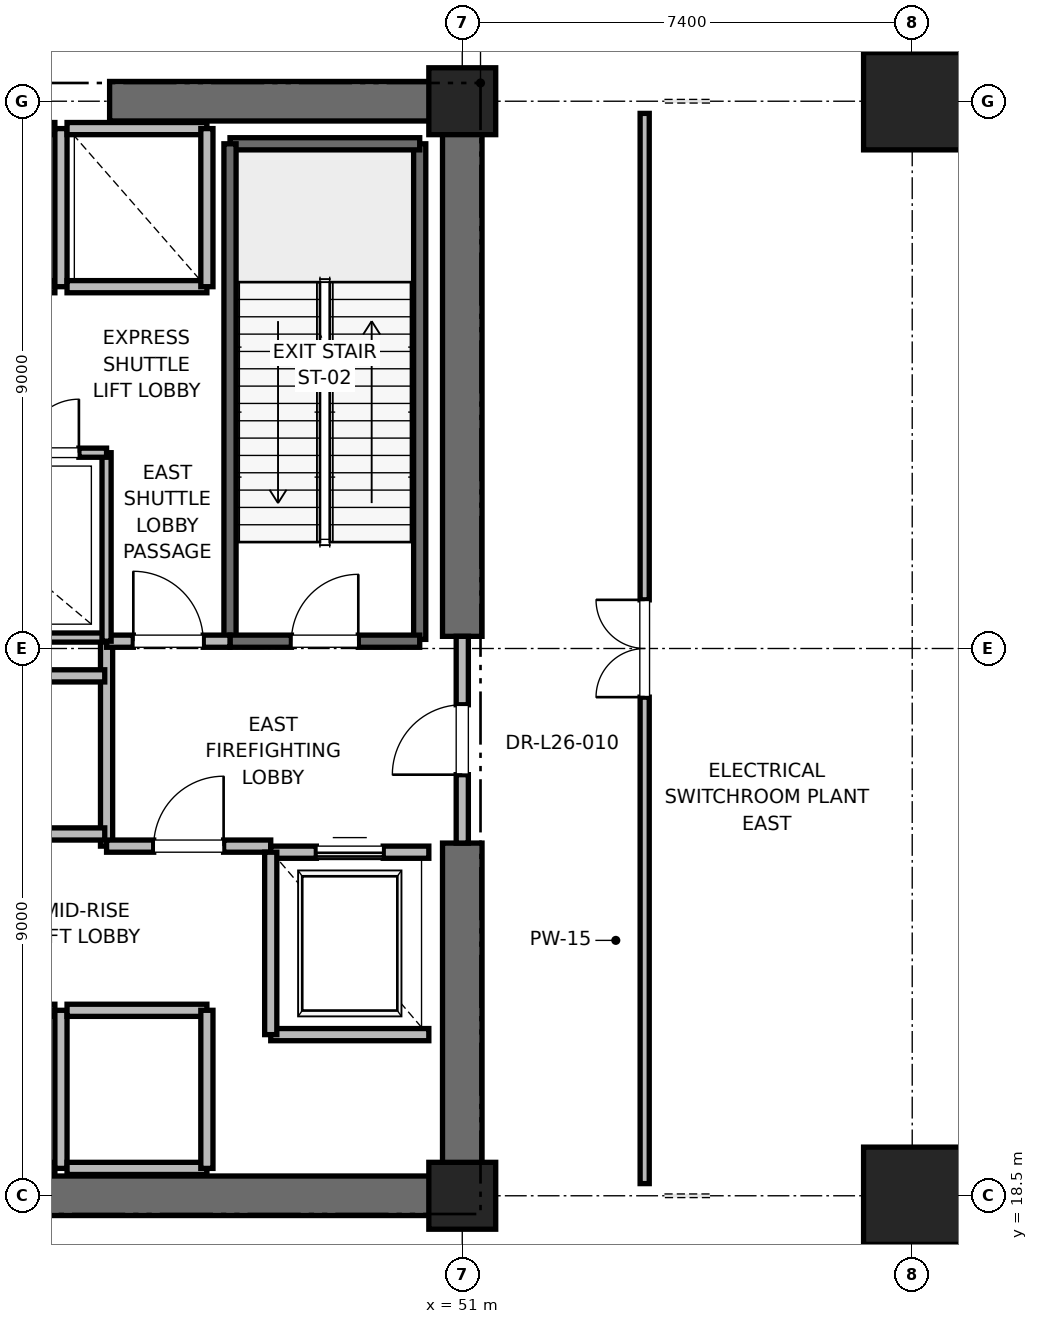
"""IFC4 building model, lengths in metres.
Left out: names, types, materials, properties, quantities, classifications, styles, units other than length and angle.
Written with IfcOpenShell. Run it as: python <this file> out.ifc"""

import sys

from ifc_helpers import new_model, si_unit, direction, frame, frame_2d, origin, origin_2d, place, context, subcontext, project, spatial, rectangle, extrude, element, fill, save


model = new_model("IFC4")
c1 = context("Model", 3, precision=1e-05, world=origin(), true_north=direction((0.0, 1.0)))
c2 = subcontext(c1, "Body", "Model", "MODEL_VIEW")
j1 = project(units=[si_unit("LENGTHUNIT", "METRE"), si_unit("PLANEANGLEUNIT", "RADIAN")], contexts=[c1])
p1 = place(None, origin())
s1 = spatial("IfcSite", under=j1, at=p1, CompositionType="ELEMENT")
p2 = place(p1, origin())
s2 = spatial("IfcBuilding", under=s1, at=p2, CompositionType="ELEMENT")
p3 = place(p2, frame((0.0, 0.0, 113.0)))
s3 = spatial("IfcBuildingStorey", under=s2, at=p3, CompositionType="ELEMENT", Elevation=113.0)
for number, where, z_axis, x_axis in (
    (1, (58.4, 18.5, 0.0), (0.0, 0.0, 1.0), (1.0, 0.0, 0.0)),
    (2, (58.4, 36.5, 0.0), (0.0, 0.0, 1.0), (1.0, 0.0, 0.0)),
):
    element("IfcColumn", number, at=place(p3, frame(where, z_axis=z_axis, x_axis=x_axis)), inside=s3, PredefinedType="COLUMN", context=c2, shape_type="SweptSolid", body=[
        extrude(rectangle(XDim=1.6, YDim=1.6, at=origin_2d()), origin(), (0.0, 0.0, 1.0), 5.4),
    ])
for number, where, z_axis, x_axis in (
    (3, (51.0, 18.5, 0.0), (0.0, 0.0, 1.0), (1.0, 0.0, 0.0)),
    (4, (51.0, 36.5, 0.0), (0.0, 0.0, 1.0), (1.0, 0.0, 0.0)),
):
    element("IfcColumn", number, at=place(p3, frame(where, z_axis=z_axis, x_axis=x_axis)), inside=s3, PredefinedType="PILASTER", context=c2, shape_type="SweptSolid", body=[
        extrude(rectangle(XDim=1.1, YDim=1.1, at=origin_2d()), origin(), (0.0, 0.0, 1.0), 5.4),
    ])
p4 = place(p3, frame((41.8, 18.5, 0.0), z_axis=(0.0, 0.0, 1.0), x_axis=(1.0, 0.0, 0.0)))
e5 = element("IfcWall", 5, at=p4, inside=s3, PredefinedType="SHEAR", context=c2, shape_type="SweptSolid", body=[
    extrude(rectangle(XDim=9.2, YDim=0.65, at=frame_2d((4.6, 0.0))), origin(), (0.0, 0.0, 1.0), 5.1),
])
for number, where, z_axis, x_axis in (
    (6, (45.2, 36.5, 0.0), (0.0, 0.0, 1.0), (1.0, 0.0, 0.0)),
    (7, (51.0, 18.5, 0.0), (0.0, 0.0, 1.0), (0.0, 1.0, 0.0)),
):
    element("IfcWall", number, at=place(p3, frame(where, z_axis=z_axis, x_axis=x_axis)), inside=s3, PredefinedType="SHEAR", context=c2, shape_type="SweptSolid", body=[
        extrude(rectangle(XDim=5.8, YDim=0.65, at=frame_2d((2.9, 0.0))), origin(), (0.0, 0.0, 1.0), 5.1),
    ])
p5 = place(p3, frame((51.0, 27.7, 0.0), z_axis=(0.0, 0.0, 1.0), x_axis=(0.0, 1.0, 0.0)))
e8 = element("IfcWall", 8, at=p5, inside=s3, PredefinedType="SHEAR", context=c2, shape_type="SweptSolid", body=[
    extrude(rectangle(XDim=8.8, YDim=0.65, at=frame_2d((4.4, 0.0))), origin(), (0.0, 0.0, 1.0), 5.1),
])
p6 = place(p3, frame((50.3, 27.65, 0.0), z_axis=(0.0, 0.0, 1.0), x_axis=(0.0, 1.0, 0.0)))
e9 = element("IfcWall", 9, at=p6, inside=s3, PredefinedType="SOLIDWALL", context=c2, shape_type="SweptSolid", body=[
    extrude(rectangle(XDim=8.15, YDim=0.2, at=frame_2d((4.075, 0.0))), origin(), (0.0, 0.0, 1.0), 5.1),
])
p7 = place(p3, frame((47.18, 35.8, 0.0), z_axis=(0.0, 0.0, 1.0), x_axis=(1.0, 0.0, 0.0)))
e10 = element("IfcWall", 10, at=p7, inside=s3, PredefinedType="SOLIDWALL", context=c2, shape_type="SweptSolid", body=[
    extrude(rectangle(XDim=3.12, YDim=0.2, at=frame_2d((1.56, 0.0))), origin(), (0.0, 0.0, 1.0), 5.1),
])
p8 = place(p3, frame((47.18, 27.62, 0.0), z_axis=(0.0, 0.0, 1.0), x_axis=(0.0, 1.0, 0.0)))
e11 = element("IfcWall", 11, at=p8, inside=s3, PredefinedType="SOLIDWALL", context=c2, shape_type="SweptSolid", body=[
    extrude(rectangle(XDim=8.18, YDim=0.2, at=frame_2d((4.09, 0.0))), origin(), (0.0, 0.0, 1.0), 5.1),
])
p9 = place(p3, frame((47.18, 27.62, 0.0), z_axis=(0.0, 0.0, 1.0), x_axis=(1.0, 0.0, 0.0)))
e12 = element("IfcWall", 12, at=p9, inside=s3, PredefinedType="SOLIDWALL", context=c2, shape_type="SweptSolid", body=[
    extrude(rectangle(XDim=3.12, YDim=0.2, at=frame_2d((1.56, 0.0))), origin(), (0.0, 0.0, 1.0), 5.1),
])
p10 = place(p9, frame((1.01, 0.0, 0.0)))
e13 = element("IfcOpeningElement", 13, at=p10, cuts=e12, PredefinedType="OPENING", context=c2, shape_type="SweptSolid", body=[
    extrude(rectangle(XDim=1.1, YDim=2.15, at=frame_2d((0.55, 1.075))), frame((0.0, 0.1, 0.0), z_axis=(0.0, -1.0, 0.0), x_axis=(1.0, 0.0, 0.0)), (0.0, 0.0, 1.0), 0.2),
])
p11 = place(p3, frame((45.15, 24.25, 0.0), z_axis=(0.0, 0.0, 1.0), x_axis=(0.0, 1.0, 0.0)))
e14 = element("IfcWall", 14, at=p11, inside=s3, PredefinedType="PARTITIONING", context=c2, shape_type="SweptSolid", body=[
    extrude(rectangle(XDim=3.37, YDim=0.2, at=frame_2d((1.685, 0.0))), origin(), (0.0, 0.0, 1.0), 5.1),
])
p12 = place(p3, frame((45.15, 24.25, 0.0), z_axis=(0.0, 0.0, 1.0), x_axis=(1.0, 0.0, 0.0)))
e15 = element("IfcWall", 15, at=p12, inside=s3, PredefinedType="PARTITIONING", context=c2, shape_type="SweptSolid", body=[
    extrude(rectangle(XDim=2.7, YDim=0.2, at=frame_2d((1.35, 0.0))), origin(), (0.0, 0.0, 1.0), 5.1),
])
p13 = place(p12, frame((0.775, 0.0, 0.0)))
e16 = element("IfcOpeningElement", 16, at=p13, cuts=e15, PredefinedType="OPENING", context=c2, shape_type="SweptSolid", body=[
    extrude(rectangle(XDim=1.15, YDim=2.2, at=frame_2d((0.575, 1.1))), frame((0.0, 0.1, 0.0), z_axis=(0.0, -1.0, 0.0), x_axis=(1.0, 0.0, 0.0)), (0.0, 0.0, 1.0), 0.2),
])
p14 = place(p3, frame((45.15, 27.62, 0.0), z_axis=(0.0, 0.0, 1.0), x_axis=(1.0, 0.0, 0.0)))
e17 = element("IfcWall", 17, at=p14, inside=s3, PredefinedType="PARTITIONING", context=c2, shape_type="SweptSolid", body=[
    extrude(rectangle(XDim=2.03, YDim=0.2, at=frame_2d((1.015, 0.0))), origin(), (0.0, 0.0, 1.0), 5.1),
])
p15 = place(p14, frame((0.44, 0.0, 0.0)))
e18 = element("IfcOpeningElement", 18, at=p15, cuts=e17, PredefinedType="OPENING", context=c2, shape_type="SweptSolid", body=[
    extrude(rectangle(XDim=1.15, YDim=2.2, at=frame_2d((0.575, 1.1))), frame((0.0, 0.1, 0.0), z_axis=(0.0, -1.0, 0.0), x_axis=(1.0, 0.0, 0.0)), (0.0, 0.0, 1.0), 0.2),
])
p16 = place(p3, frame((51.0, 24.3, 0.0), z_axis=(0.0, 0.0, 1.0), x_axis=(0.0, 1.0, 0.0)))
e19 = element("IfcWall", 19, at=p16, inside=s3, PredefinedType="PARTITIONING", context=c2, shape_type="SweptSolid", body=[
    extrude(rectangle(XDim=3.4, YDim=0.2, at=frame_2d((1.7, 0.0))), origin(), (0.0, 0.0, 1.0), 3.88),
])
p17 = place(p16, frame((1.125, 0.0, 0.0)))
e20 = element("IfcOpeningElement", 20, at=p17, cuts=e19, PredefinedType="OPENING", context=c2, shape_type="SweptSolid", body=[
    extrude(rectangle(XDim=1.15, YDim=2.2, at=frame_2d((0.575, 1.1))), frame((0.0, 0.1, 0.0), z_axis=(0.0, -1.0, 0.0), x_axis=(1.0, 0.0, 0.0)), (0.0, 0.0, 1.0), 0.2),
])
p18 = place(p3, frame((47.85, 21.15, 0.0), z_axis=(0.0, 0.0, 1.0), x_axis=(1.0, 0.0, 0.0)))
e21 = element("IfcWall", 21, at=p18, inside=s3, PredefinedType="SOLIDWALL", context=c2, shape_type="SweptSolid", body=[
    extrude(rectangle(XDim=2.6, YDim=0.2, at=frame_2d((1.3, 0.0))), origin(), (0.0, 0.0, 1.0), 5.1),
])
p19 = place(p3, frame((50.45, 24.15, 0.0), z_axis=(0.0, 0.0, 1.0), x_axis=(-1.0, 0.0, 0.0)))
e22 = element("IfcWall", 22, at=p19, inside=s3, PredefinedType="SOLIDWALL", context=c2, shape_type="SweptSolid", body=[
    extrude(rectangle(XDim=2.6, YDim=0.2, at=frame_2d((1.3, 0.0))), origin(), (0.0, 0.0, 1.0), 3.88),
])
p20 = place(p19, frame((0.75, 0.0, 0.0)))
e23 = element("IfcOpeningElement", 23, at=p20, cuts=e22, PredefinedType="OPENING", context=c2, shape_type="SweptSolid", body=[
    extrude(rectangle(XDim=1.1, YDim=2.2, at=frame_2d((0.55, 1.1))), frame((0.0, 0.1, 0.0), z_axis=(0.0, -1.0, 0.0), x_axis=(1.0, 0.0, 0.0)), (0.0, 0.0, 1.0), 0.2),
])
p21 = place(p3, frame((47.85, 24.15, 0.0), z_axis=(0.0, 0.0, 1.0), x_axis=(0.0, -1.0, 0.0)))
e24 = element("IfcWall", 24, at=p21, inside=s3, PredefinedType="SOLIDWALL", context=c2, shape_type="SweptSolid", body=[
    extrude(rectangle(XDim=3.0, YDim=0.2, at=frame_2d((1.5, 0.0))), origin(), (0.0, 0.0, 1.0), 5.1),
])
p22 = place(p3, frame((42.0, 18.95, 0.0), z_axis=(0.0, 0.0, 1.0), x_axis=(1.0, 0.0, 0.0)))
e25 = element("IfcWall", 25, at=p22, inside=s3, PredefinedType="SOLIDWALL", context=c2, shape_type="SweptSolid", body=[
    extrude(rectangle(XDim=2.3, YDim=0.2, at=frame_2d((1.15, 0.0))), origin(), (0.0, 0.0, 1.0), 3.88),
])
p23 = place(p3, frame((44.3, 21.55, 0.0), z_axis=(0.0, 0.0, 1.0), x_axis=(-1.0, 0.0, 0.0)))
e26 = element("IfcWall", 26, at=p23, inside=s3, PredefinedType="SOLIDWALL", context=c2, shape_type="SweptSolid", body=[
    extrude(rectangle(XDim=2.3, YDim=0.2, at=frame_2d((1.15, 0.0))), origin(), (0.0, 0.0, 1.0), 5.1),
])
p24 = place(p3, frame((44.4, 18.95, 0.0), z_axis=(0.0, 0.0, 1.0), x_axis=(0.0, 1.0, 0.0)))
e27 = element("IfcWall", 27, at=p24, inside=s3, PredefinedType="SOLIDWALL", context=c2, shape_type="SweptSolid", body=[
    extrude(rectangle(XDim=2.6, YDim=0.2, at=frame_2d((1.3, 0.0))), origin(), (0.0, 0.0, 1.0), 5.1),
])
for number, where, z_axis, x_axis in (
    (28, (44.5, 18.95, 0.0), (0.0, 0.0, 1.0), (1.0, 0.0, 0.0)),
    (29, (46.8, 21.55, 0.0), (0.0, 0.0, 1.0), (-1.0, 0.0, 0.0)),
):
    element("IfcWall", number, at=place(p3, frame(where, z_axis=z_axis, x_axis=x_axis)), inside=s3, PredefinedType="SOLIDWALL", context=c2, shape_type="SweptSolid", body=[
        extrude(rectangle(XDim=2.3, YDim=0.2, at=frame_2d((1.15, 0.0))), origin(), (0.0, 0.0, 1.0), 5.1),
    ])
p25 = place(p3, frame((46.8, 18.95, 0.0), z_axis=(0.0, 0.0, 1.0), x_axis=(0.0, 1.0, 0.0)))
e30 = element("IfcWall", 30, at=p25, inside=s3, PredefinedType="SOLIDWALL", context=c2, shape_type="SweptSolid", body=[
    extrude(rectangle(XDim=2.6, YDim=0.2, at=frame_2d((1.3, 0.0))), origin(), (0.0, 0.0, 1.0), 5.1),
])
for number, where, z_axis, x_axis in (
    (31, (43.46, 24.45, 0.0), (0.0, 0.0, 1.0), (1.0, 0.0, 0.0)),
    (32, (45.12, 27.05, 0.0), (0.0, 0.0, 1.0), (-1.0, 0.0, 0.0)),
):
    element("IfcWall", number, at=place(p3, frame(where, z_axis=z_axis, x_axis=x_axis)), inside=s3, PredefinedType="SOLIDWALL", context=c2, shape_type="SweptSolid", body=[
        extrude(rectangle(XDim=1.66, YDim=0.2, at=frame_2d((0.83, 0.0))), origin(), (0.0, 0.0, 1.0), 5.1),
    ])
p26 = place(p3, frame((42.0, 33.45, 0.0), z_axis=(0.0, 0.0, 1.0), x_axis=(1.0, 0.0, 0.0)))
e33 = element("IfcWall", 33, at=p26, inside=s3, PredefinedType="SOLIDWALL", context=c2, shape_type="SweptSolid", body=[
    extrude(rectangle(XDim=2.3, YDim=0.2, at=frame_2d((1.15, 0.0))), origin(), (0.0, 0.0, 1.0), 5.1),
])
p27 = place(p3, frame((44.3, 36.05, 0.0), z_axis=(0.0, 0.0, 1.0), x_axis=(-1.0, 0.0, 0.0)))
e34 = element("IfcWall", 34, at=p27, inside=s3, PredefinedType="SOLIDWALL", context=c2, shape_type="SweptSolid", body=[
    extrude(rectangle(XDim=2.3, YDim=0.2, at=frame_2d((1.15, 0.0))), origin(), (0.0, 0.0, 1.0), 3.88),
])
p28 = place(p3, frame((44.4, 33.45, 0.0), z_axis=(0.0, 0.0, 1.0), x_axis=(0.0, 1.0, 0.0)))
e35 = element("IfcWall", 35, at=p28, inside=s3, PredefinedType="SOLIDWALL", context=c2, shape_type="SweptSolid", body=[
    extrude(rectangle(XDim=2.6, YDim=0.2, at=frame_2d((1.3, 0.0))), origin(), (0.0, 0.0, 1.0), 3.88),
])
p29 = place(p3, frame((44.5, 33.45, 0.0), z_axis=(0.0, 0.0, 1.0), x_axis=(1.0, 0.0, 0.0)))
e36 = element("IfcWall", 36, at=p29, inside=s3, PredefinedType="SOLIDWALL", context=c2, shape_type="SweptSolid", body=[
    extrude(rectangle(XDim=2.3, YDim=0.2, at=frame_2d((1.15, 0.0))), origin(), (0.0, 0.0, 1.0), 5.1),
])
p30 = place(p3, frame((46.8, 36.05, 0.0), z_axis=(0.0, 0.0, 1.0), x_axis=(-1.0, 0.0, 0.0)))
e37 = element("IfcWall", 37, at=p30, inside=s3, PredefinedType="SOLIDWALL", context=c2, shape_type="SweptSolid", body=[
    extrude(rectangle(XDim=2.3, YDim=0.2, at=frame_2d((1.15, 0.0))), origin(), (0.0, 0.0, 1.0), 3.88),
])
p31 = place(p3, frame((46.8, 33.45, 0.0), z_axis=(0.0, 0.0, 1.0), x_axis=(0.0, 1.0, 0.0)))
e38 = element("IfcWall", 38, at=p31, inside=s3, PredefinedType="SOLIDWALL", context=c2, shape_type="SweptSolid", body=[
    extrude(rectangle(XDim=2.6, YDim=0.2, at=frame_2d((1.3, 0.0))), origin(), (0.0, 0.0, 1.0), 5.1),
])
p32 = place(p3, frame((41.56, 27.68, 0.0), z_axis=(0.0, 0.0, 1.0), x_axis=(1.0, 0.0, 0.0)))
e39 = element("IfcWall", 39, at=p32, inside=s3, PredefinedType="PARTITIONING", context=c2, shape_type="SweptSolid", body=[
    extrude(rectangle(XDim=3.59, YDim=0.15, at=frame_2d((1.795, 0.0))), origin(), (0.0, 0.0, 1.0), 2.85),
])
p33 = place(p3, frame((45.15, 27.62, 0.0), z_axis=(0.0, 0.0, 1.0), x_axis=(0.0, 1.0, 0.0)))
e40 = element("IfcWall", 40, at=p33, inside=s3, PredefinedType="PARTITIONING", context=c2, shape_type="SweptSolid", body=[
    extrude(rectangle(XDim=3.1, YDim=0.15, at=frame_2d((1.55, 0.0))), origin(), (0.0, 0.0, 1.0), 2.85),
])
p34 = place(p3, frame((43.36, 30.72, 0.0), z_axis=(0.0, 0.0, 1.0), x_axis=(1.0, 0.0, 0.0)))
e41 = element("IfcWall", 41, at=p34, inside=s3, PredefinedType="PARTITIONING", context=c2, shape_type="SweptSolid", body=[
    extrude(rectangle(XDim=1.79, YDim=0.15, at=frame_2d((0.895, 0.0))), origin(), (0.0, 0.0, 1.0), 2.85),
])
p35 = place(p34, frame((0.455, 0.0, 0.0)))
e42 = element("IfcOpeningElement", 42, at=p35, cuts=e41, PredefinedType="OPENING", context=c2, shape_type="SweptSolid", body=[
    extrude(rectangle(XDim=0.88, YDim=2.1, at=frame_2d((0.44, 1.05))), frame((0.0, 0.075, 0.0), z_axis=(0.0, -1.0, 0.0), x_axis=(1.0, 0.0, 0.0)), (0.0, 0.0, 1.0), 0.15),
])
p36 = place(p3, frame((54.0, 18.7, 0.0), z_axis=(0.0, 0.0, 1.0), x_axis=(0.0, 1.0, 0.0)))
e43 = element("IfcWall", 43, at=p36, inside=s3, PredefinedType="PARTITIONING", context=c2, shape_type="SweptSolid", body=[
    extrude(rectangle(XDim=17.6, YDim=0.15, at=frame_2d((8.8, 0.0))), origin(), (0.0, 0.0, 1.0), 2.85),
])
p37 = place(p36, frame((8.0, 0.0, 0.0)))
e44 = element("IfcOpeningElement", 44, at=p37, cuts=e43, PredefinedType="OPENING", context=c2, shape_type="SweptSolid", body=[
    extrude(rectangle(XDim=1.6, YDim=2.25, at=frame_2d((0.8, 1.125))), frame((0.0, 0.075, 0.0), z_axis=(0.0, -1.0, 0.0), x_axis=(1.0, 0.0, 0.0)), (0.0, 0.0, 1.0), 0.15),
])
p38 = place(p10, origin())
e45 = element("IfcDoor", 45, at=p38, inside=s3, OperationType="SINGLE_SWING_RIGHT", PredefinedType="DOOR", context=c2, shape_type="SweptSolid", body=[
    extrude(rectangle(XDim=1.1, YDim=2.15, at=frame_2d((0.55, 1.075))), frame((0.0, 0.025, 0.0), z_axis=(0.0, -1.0, 0.0), x_axis=(1.0, 0.0, 0.0)), (0.0, 0.0, 1.0), 0.05),
])
fill(e13, e45)
p39 = place(p13, origin())
e46 = element("IfcDoor", 46, at=p39, inside=s3, OperationType="SINGLE_SWING_RIGHT", PredefinedType="DOOR", context=c2, shape_type="SweptSolid", body=[
    extrude(rectangle(XDim=1.15, YDim=2.2, at=frame_2d((0.575, 1.1))), frame((0.0, 0.025, 0.0), z_axis=(0.0, -1.0, 0.0), x_axis=(1.0, 0.0, 0.0)), (0.0, 0.0, 1.0), 0.05),
])
fill(e16, e46)
p40 = place(p15, origin())
e47 = element("IfcDoor", 47, at=p40, inside=s3, OperationType="SINGLE_SWING_LEFT", PredefinedType="DOOR", context=c2, shape_type="SweptSolid", body=[
    extrude(rectangle(XDim=1.15, YDim=2.2, at=frame_2d((0.575, 1.1))), frame((0.0, 0.025, 0.0), z_axis=(0.0, -1.0, 0.0), x_axis=(1.0, 0.0, 0.0)), (0.0, 0.0, 1.0), 0.05),
])
fill(e18, e47)
p41 = place(p17, origin())
e48 = element("IfcDoor", 48, at=p41, inside=s3, OperationType="SINGLE_SWING_LEFT", PredefinedType="DOOR", context=c2, shape_type="SweptSolid", body=[
    extrude(rectangle(XDim=1.15, YDim=2.2, at=frame_2d((0.575, 1.1))), frame((0.0, 0.025, 0.0), z_axis=(0.0, -1.0, 0.0), x_axis=(1.0, 0.0, 0.0)), (0.0, 0.0, 1.0), 0.05),
])
fill(e20, e48)
p42 = place(p20, origin())
e49 = element("IfcDoor", 49, at=p42, inside=s3, OperationType="SLIDING_TO_RIGHT", PredefinedType="DOOR", context=c2, shape_type="SweptSolid", body=[
    extrude(rectangle(XDim=1.1, YDim=2.2, at=frame_2d((0.55, 1.1))), frame((0.0, 0.025, 0.0), z_axis=(0.0, -1.0, 0.0), x_axis=(1.0, 0.0, 0.0)), (0.0, 0.0, 1.0), 0.05),
])
fill(e23, e49)
p43 = place(p35, origin())
e50 = element("IfcDoor", 50, at=p43, inside=s3, OperationType="SINGLE_SWING_RIGHT", PredefinedType="DOOR", context=c2, shape_type="SweptSolid", body=[
    extrude(rectangle(XDim=0.88, YDim=2.1, at=frame_2d((0.44, 1.05))), frame((0.0, 0.025, 0.0), z_axis=(0.0, -1.0, 0.0), x_axis=(1.0, 0.0, 0.0)), (0.0, 0.0, 1.0), 0.05),
])
fill(e42, e50)
p44 = place(p37, origin())
e51 = element("IfcDoor", 51, at=p44, inside=s3, OperationType="DOUBLE_DOOR_SINGLE_SWING", PredefinedType="DOOR", context=c2, shape_type="SweptSolid", body=[
    extrude(rectangle(XDim=1.6, YDim=2.25, at=frame_2d((0.8, 1.125))), frame((0.0, 0.025, 0.0), z_axis=(0.0, -1.0, 0.0), x_axis=(1.0, 0.0, 0.0)), (0.0, 0.0, 1.0), 0.05),
])
fill(e44, e51)
save(model, sys.argv[1])
